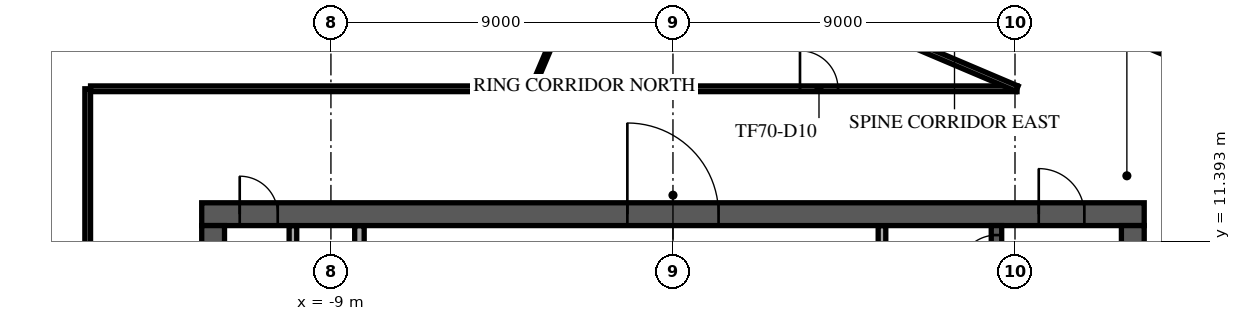
"""IFC4 building model, lengths in metres.
Left out: names, types, materials, properties, quantities, classifications, styles, units other than length and angle.
Written with IfcOpenShell. Run it as: python <this file> out.ifc"""

import sys

from ifc_helpers import new_model, si_unit, direction, frame, frame_2d, origin, place, context, subcontext, project, spatial, rectangle, extrude, element, fill, save


model = new_model("IFC4")
c1 = context("Model", 3, precision=1e-05, world=origin(), true_north=direction((0.0, 1.0)))
c2 = subcontext(c1, "Body", "Model", "MODEL_VIEW")
j1 = project(units=[si_unit("LENGTHUNIT", "METRE"), si_unit("PLANEANGLEUNIT", "RADIAN")], contexts=[c1])
p1 = place(None, origin())
s1 = spatial("IfcSite", under=j1, at=p1, CompositionType="ELEMENT")
p2 = place(p1, origin())
s2 = spatial("IfcBuilding", under=s1, at=p2, CompositionType="ELEMENT")
p3 = place(p2, frame((0.0, 0.0, 300.5)))
s3 = spatial("IfcBuildingStorey", under=s2, at=p3, CompositionType="ELEMENT", Elevation=300.5)
p4 = place(p3, frame((-12.4, 12.1, 0.0), z_axis=(0.0, 0.0, 1.0), x_axis=(1.0, 0.0, 0.0)))
e1 = element("IfcWall", 1, at=p4, inside=s3, PredefinedType="SHEAR", context=c2, shape_type="SweptSolid", body=[
    extrude(rectangle(XDim=24.8, YDim=0.6, at=frame_2d((12.4, 0.0))), origin(), (0.0, 0.0, 1.0), 3.65),
])
p5 = place(p4, frame((11.2, 0.0, 0.0)))
e2 = element("IfcOpeningElement", 2, at=p5, cuts=e1, PredefinedType="OPENING", context=c2, shape_type="SweptSolid", body=[
    extrude(rectangle(XDim=2.4, YDim=2.4, at=frame_2d((1.2, 1.2))), frame((0.0, 0.31, 0.0), z_axis=(0.0, -1.0, 0.0), x_axis=(1.0, 0.0, 0.0)), (0.0, 0.0, 1.0), 0.62),
])
p6 = place(p4, frame((22.025, 0.0, 0.0)))
e3 = element("IfcOpeningElement", 3, at=p6, cuts=e1, PredefinedType="OPENING", context=c2, shape_type="SweptSolid", body=[
    extrude(rectangle(XDim=1.2, YDim=2.1, at=frame_2d((0.6, 1.05))), frame((0.0, 0.31, 0.0), z_axis=(0.0, -1.0, 0.0), x_axis=(1.0, 0.0, 0.0)), (0.0, 0.0, 1.0), 0.62),
])
p7 = place(p4, frame((1.0, 0.0, 0.0)))
e4 = element("IfcOpeningElement", 4, at=p7, cuts=e1, PredefinedType="OPENING", context=c2, shape_type="SweptSolid", body=[
    extrude(rectangle(XDim=1.0, YDim=2.1, at=frame_2d((0.5, 1.05))), frame((0.0, 0.31, 0.0), z_axis=(0.0, -1.0, 0.0), x_axis=(1.0, 0.0, 0.0)), (0.0, 0.0, 1.0), 0.62),
])
p8 = place(p3, frame((12.1, -11.8, 0.0), z_axis=(0.0, 0.0, 1.0), x_axis=(0.0, 1.0, 0.0)))
e5 = element("IfcWall", 5, at=p8, inside=s3, PredefinedType="SHEAR", context=c2, shape_type="SweptSolid", body=[
    extrude(rectangle(XDim=23.6, YDim=0.6, at=frame_2d((11.8, 0.0))), origin(), (0.0, 0.0, 1.0), 3.65),
])
p9 = place(p8, frame((10.6, 0.0, 0.0)))
e6 = element("IfcOpeningElement", 6, at=p9, cuts=e5, PredefinedType="OPENING", context=c2, shape_type="SweptSolid", body=[
    extrude(rectangle(XDim=2.4, YDim=2.4, at=frame_2d((1.2, 1.2))), frame((0.0, 0.31, 0.0), z_axis=(0.0, -1.0, 0.0), x_axis=(1.0, 0.0, 0.0)), (0.0, 0.0, 1.0), 0.62),
])
p10 = place(p3, frame((-12.1, -11.8, 0.0), z_axis=(0.0, 0.0, 1.0), x_axis=(0.0, 1.0, 0.0)))
e7 = element("IfcWall", 7, at=p10, inside=s3, PredefinedType="SHEAR", context=c2, shape_type="SweptSolid", body=[
    extrude(rectangle(XDim=23.6, YDim=0.6, at=frame_2d((11.8, 0.0))), origin(), (0.0, 0.0, 1.0), 3.65),
])
p11 = place(p10, frame((10.6, 0.0, 0.0)))
e8 = element("IfcOpeningElement", 8, at=p11, cuts=e7, PredefinedType="OPENING", context=c2, shape_type="SweptSolid", body=[
    extrude(rectangle(XDim=2.4, YDim=2.4, at=frame_2d((1.2, 1.2))), frame((0.0, 0.31, 0.0), z_axis=(0.0, -1.0, 0.0), x_axis=(1.0, 0.0, 0.0)), (0.0, 0.0, 1.0), 0.62),
])
p12 = place(p3, frame((8.512, 4.55, 0.0), z_axis=(0.0, 0.0, 1.0), x_axis=(0.0, 1.0, 0.0)))
e9 = element("IfcWall", 9, at=p12, inside=s3, PredefinedType="SOLIDWALL", context=c2, shape_type="SweptSolid", body=[
    extrude(rectangle(XDim=7.25, YDim=0.275, at=frame_2d((3.625, 0.0))), origin(), (0.0, 0.0, 1.0), 3.65),
])
p13 = place(p12, frame((6.0, 0.0, 0.0)))
e10 = element("IfcOpeningElement", 10, at=p13, cuts=e9, PredefinedType="OPENING", context=c2, shape_type="SweptSolid", body=[
    extrude(rectangle(XDim=1.0, YDim=2.1, at=frame_2d((0.5, 1.05))), frame((0.0, 0.147, 0.0), z_axis=(0.0, -1.0, 0.0), x_axis=(1.0, 0.0, 0.0)), (0.0, 0.0, 1.0), 0.295),
])
p14 = place(p3, frame((-10.0, 4.78, 0.0), z_axis=(0.0, 0.0, 1.0), x_axis=(0.0, 1.0, 0.0)))
e11 = element("IfcWall", 11, at=p14, inside=s3, PredefinedType="PARTITIONING", context=c2, shape_type="SweptSolid", body=[
    extrude(rectangle(XDim=7.015, YDim=0.2, at=frame_2d((3.507, 0.0))), origin(), (0.0, 0.0, 1.0), 3.65),
])
p15 = place(p14, frame((2.92, 0.0, 0.0)))
e12 = element("IfcOpeningElement", 12, at=p15, cuts=e11, PredefinedType="OPENING", context=c2, shape_type="SweptSolid", body=[
    extrude(rectangle(XDim=1.0, YDim=2.1, at=frame_2d((0.5, 1.05))), frame((0.0, 0.11, 0.0), z_axis=(0.0, -1.0, 0.0), x_axis=(1.0, 0.0, 0.0)), (0.0, 0.0, 1.0), 0.22),
])
p16 = place(p3, frame((-8.25, 8.805, 0.0), z_axis=(0.0, 0.0, 1.0), x_axis=(0.0, 1.0, 0.0)))
e13 = element("IfcWall", 13, at=p16, inside=s3, PredefinedType="PARTITIONING", context=c2, shape_type="SweptSolid", body=[
    extrude(rectangle(XDim=2.99, YDim=0.25, at=frame_2d((1.495, 0.0))), origin(), (0.0, 0.0, 1.0), 3.65),
])
p17 = place(p16, frame((0.895, 0.0, 0.0)))
e14 = element("IfcOpeningElement", 14, at=p17, cuts=e13, PredefinedType="OPENING", context=c2, shape_type="SweptSolid", body=[
    extrude(rectangle(XDim=1.0, YDim=2.1, at=frame_2d((0.5, 1.05))), frame((0.0, 0.135, 0.0), z_axis=(0.0, -1.0, 0.0), x_axis=(1.0, 0.0, 0.0)), (0.0, 0.0, 1.0), 0.27),
])
p18 = place(p3, frame((5.5, 8.805, 0.0), z_axis=(0.0, 0.0, 1.0), x_axis=(0.0, 1.0, 0.0)))
e15 = element("IfcWall", 15, at=p18, inside=s3, PredefinedType="PARTITIONING", context=c2, shape_type="SweptSolid", body=[
    extrude(rectangle(XDim=2.99, YDim=0.2, at=frame_2d((1.495, 0.0))), origin(), (0.0, 0.0, 1.0), 3.65),
])
p19 = place(p18, frame((0.532, 0.0, 0.0)))
e16 = element("IfcOpeningElement", 16, at=p19, cuts=e15, PredefinedType="OPENING", context=c2, shape_type="SweptSolid", body=[
    extrude(rectangle(XDim=1.8, YDim=2.1, at=frame_2d((0.9, 1.05))), frame((0.0, 0.11, 0.0), z_axis=(0.0, -1.0, 0.0), x_axis=(1.0, 0.0, 0.0)), (0.0, 0.0, 1.0), 0.22),
])
p20 = place(p3, frame((-15.005, 32.985, 0.0), z_axis=(0.0, 0.0, 1.0), x_axis=(-0.39073034436, -0.920505186295, 0.0)))
e17 = element("IfcWall", 17, at=p20, inside=s3, PredefinedType="STANDARD", context=c2, shape_type="SweptSolid", body=[
    extrude(rectangle(XDim=48.49, YDim=0.6, at=frame_2d((24.245, 0.0))), origin(), (0.0, 0.0, 1.0), 3.65),
])
p21 = place(p20, frame((1.204, 0.0, 0.9)))
e18 = element("IfcOpeningElement", 18, at=p21, cuts=e17, PredefinedType="OPENING", context=c2, shape_type="SweptSolid", body=[
    extrude(rectangle(XDim=2.0, YDim=2.1, at=frame_2d((1.0, 1.05))), frame((0.0, 0.31, 0.0), z_axis=(0.0, -1.0, 0.0), x_axis=(1.0, 0.0, 0.0)), (0.0, 0.0, 1.0), 0.62),
])
p22 = place(p20, frame((5.612, 0.0, 0.9)))
e19 = element("IfcOpeningElement", 19, at=p22, cuts=e17, PredefinedType="OPENING", context=c2, shape_type="SweptSolid", body=[
    extrude(rectangle(XDim=2.0, YDim=2.1, at=frame_2d((1.0, 1.05))), frame((0.0, 0.31, 0.0), z_axis=(0.0, -1.0, 0.0), x_axis=(1.0, 0.0, 0.0)), (0.0, 0.0, 1.0), 0.62),
])
p23 = place(p20, frame((10.021, 0.0, 0.9)))
e20 = element("IfcOpeningElement", 20, at=p23, cuts=e17, PredefinedType="OPENING", context=c2, shape_type="SweptSolid", body=[
    extrude(rectangle(XDim=2.0, YDim=2.1, at=frame_2d((1.0, 1.05))), frame((0.0, 0.31, 0.0), z_axis=(0.0, -1.0, 0.0), x_axis=(1.0, 0.0, 0.0)), (0.0, 0.0, 1.0), 0.62),
])
p24 = place(p20, frame((14.428, 0.0, 0.9)))
e21 = element("IfcOpeningElement", 21, at=p24, cuts=e17, PredefinedType="OPENING", context=c2, shape_type="SweptSolid", body=[
    extrude(rectangle(XDim=2.0, YDim=2.1, at=frame_2d((1.0, 1.05))), frame((0.0, 0.31, 0.0), z_axis=(0.0, -1.0, 0.0), x_axis=(1.0, 0.0, 0.0)), (0.0, 0.0, 1.0), 0.62),
])
p25 = place(p20, frame((18.837, 0.0, 0.9)))
e22 = element("IfcOpeningElement", 22, at=p25, cuts=e17, PredefinedType="OPENING", context=c2, shape_type="SweptSolid", body=[
    extrude(rectangle(XDim=2.0, YDim=2.1, at=frame_2d((1.0, 1.05))), frame((0.0, 0.31, 0.0), z_axis=(0.0, -1.0, 0.0), x_axis=(1.0, 0.0, 0.0)), (0.0, 0.0, 1.0), 0.62),
])
p26 = place(p20, frame((23.245, 0.0, 0.9)))
e23 = element("IfcOpeningElement", 23, at=p26, cuts=e17, PredefinedType="OPENING", context=c2, shape_type="SweptSolid", body=[
    extrude(rectangle(XDim=2.0, YDim=2.1, at=frame_2d((1.0, 1.05))), frame((0.0, 0.31, 0.0), z_axis=(0.0, -1.0, 0.0), x_axis=(1.0, 0.0, 0.0)), (0.0, 0.0, 1.0), 0.62),
])
p27 = place(p20, frame((27.653, 0.0, 0.9)))
e24 = element("IfcOpeningElement", 24, at=p27, cuts=e17, PredefinedType="OPENING", context=c2, shape_type="SweptSolid", body=[
    extrude(rectangle(XDim=2.0, YDim=2.1, at=frame_2d((1.0, 1.05))), frame((0.0, 0.31, 0.0), z_axis=(0.0, -1.0, 0.0), x_axis=(1.0, 0.0, 0.0)), (0.0, 0.0, 1.0), 0.62),
])
p28 = place(p20, frame((32.061, 0.0, 0.9)))
e25 = element("IfcOpeningElement", 25, at=p28, cuts=e17, PredefinedType="OPENING", context=c2, shape_type="SweptSolid", body=[
    extrude(rectangle(XDim=2.0, YDim=2.1, at=frame_2d((1.0, 1.05))), frame((0.0, 0.31, 0.0), z_axis=(0.0, -1.0, 0.0), x_axis=(1.0, 0.0, 0.0)), (0.0, 0.0, 1.0), 0.62),
])
p29 = place(p20, frame((36.469, 0.0, 0.9)))
e26 = element("IfcOpeningElement", 26, at=p29, cuts=e17, PredefinedType="OPENING", context=c2, shape_type="SweptSolid", body=[
    extrude(rectangle(XDim=2.0, YDim=2.1, at=frame_2d((1.0, 1.05))), frame((0.0, 0.31, 0.0), z_axis=(0.0, -1.0, 0.0), x_axis=(1.0, 0.0, 0.0)), (0.0, 0.0, 1.0), 0.62),
])
p30 = place(p20, frame((40.877, 0.0, 0.9)))
e27 = element("IfcOpeningElement", 27, at=p30, cuts=e17, PredefinedType="OPENING", context=c2, shape_type="SweptSolid", body=[
    extrude(rectangle(XDim=2.0, YDim=2.1, at=frame_2d((1.0, 1.05))), frame((0.0, 0.31, 0.0), z_axis=(0.0, -1.0, 0.0), x_axis=(1.0, 0.0, 0.0)), (0.0, 0.0, 1.0), 0.62),
])
p31 = place(p20, frame((45.285, 0.0, 0.9)))
e28 = element("IfcOpeningElement", 28, at=p31, cuts=e17, PredefinedType="OPENING", context=c2, shape_type="SweptSolid", body=[
    extrude(rectangle(XDim=2.0, YDim=2.1, at=frame_2d((1.0, 1.05))), frame((0.0, 0.31, 0.0), z_axis=(0.0, -1.0, 0.0), x_axis=(1.0, 0.0, 0.0)), (0.0, 0.0, 1.0), 0.62),
])
p32 = place(p3, frame((-15.4, -12.4, 0.0), z_axis=(0.0, 0.0, 1.0), x_axis=(0.0, 1.0, 0.0)))
e29 = element("IfcWall", 29, at=p32, inside=s3, PredefinedType="PARTITIONING", context=c2, shape_type="SweptSolid", body=[
    extrude(rectangle(XDim=27.8, YDim=0.15, at=frame_2d((13.9, 0.0))), origin(), (0.0, 0.0, 1.0), 3.25),
])
p33 = place(p32, frame((7.608, 0.0, 0.0)))
e30 = element("IfcOpeningElement", 30, at=p33, cuts=e29, PredefinedType="OPENING", context=c2, shape_type="SweptSolid", body=[
    extrude(rectangle(XDim=1.0, YDim=2.1, at=frame_2d((0.5, 1.05))), frame((0.0, 0.085, 0.0), z_axis=(0.0, -1.0, 0.0), x_axis=(1.0, 0.0, 0.0)), (0.0, 0.0, 1.0), 0.17),
])
p34 = place(p32, frame((16.435, 0.0, 0.0)))
e31 = element("IfcOpeningElement", 31, at=p34, cuts=e29, PredefinedType="OPENING", context=c2, shape_type="SweptSolid", body=[
    extrude(rectangle(XDim=1.0, YDim=2.1, at=frame_2d((0.5, 1.05))), frame((0.0, 0.085, 0.0), z_axis=(0.0, -1.0, 0.0), x_axis=(1.0, 0.0, 0.0)), (0.0, 0.0, 1.0), 0.17),
])
p35 = place(p3, frame((-15.325, 15.4, 0.0), z_axis=(0.0, 0.0, 1.0), x_axis=(1.0, 0.0, 0.0)))
e32 = element("IfcWall", 32, at=p35, inside=s3, PredefinedType="PARTITIONING", context=c2, shape_type="SweptSolid", body=[
    extrude(rectangle(XDim=24.378, YDim=0.15, at=frame_2d((12.189, 0.0))), origin(), (0.0, 0.0, 1.0), 3.25),
])
p36 = place(p35, frame((18.667, 0.0, 0.0)))
e33 = element("IfcOpeningElement", 33, at=p36, cuts=e32, PredefinedType="OPENING", context=c2, shape_type="SweptSolid", body=[
    extrude(rectangle(XDim=1.0, YDim=2.1, at=frame_2d((0.5, 1.05))), frame((0.0, 0.085, 0.0), z_axis=(0.0, -1.0, 0.0), x_axis=(1.0, 0.0, 0.0)), (0.0, 0.0, 1.0), 0.17),
])
p37 = place(p3, frame((-9.114, 23.116, 0.0), z_axis=(0.0, 0.0, 1.0), x_axis=(0.920508047483, -0.390723603739, 0.0)))
e34 = element("IfcWall", 34, at=p37, inside=s3, PredefinedType="PARTITIONING", context=c2, shape_type="SweptSolid", body=[
    extrude(rectangle(XDim=19.737, YDim=0.15, at=frame_2d((9.868, 0.0))), origin(), (0.0, 0.0, 1.0), 3.25),
])
p38 = place(p3, frame((-8.176, 25.325, 0.0), z_axis=(0.0, 0.0, 1.0), x_axis=(0.920507643781, -0.390724554821, 0.0)))
e35 = element("IfcWall", 35, at=p38, inside=s3, PredefinedType="PARTITIONING", context=c2, shape_type="SweptSolid", body=[
    extrude(rectangle(XDim=34.917, YDim=0.15, at=frame_2d((17.458, 0.0))), origin(), (0.0, 0.0, 1.0), 3.25),
])
p39 = place(p38, frame((5.55, 0.0, 0.0)))
e36 = element("IfcOpeningElement", 36, at=p39, cuts=e35, PredefinedType="OPENING", context=c2, shape_type="SweptSolid", body=[
    extrude(rectangle(XDim=1.8, YDim=2.1, at=frame_2d((0.9, 1.05))), frame((0.0, 0.085, 0.0), z_axis=(0.0, -1.0, 0.0), x_axis=(1.0, 0.0, 0.0)), (0.0, 0.0, 1.0), 0.17),
])
p40 = place(p38, frame((1.05, 0.0, 0.0)))
e37 = element("IfcOpeningElement", 37, at=p40, cuts=e35, PredefinedType="OPENING", context=c2, shape_type="SweptSolid", body=[
    extrude(rectangle(XDim=1.0, YDim=2.1, at=frame_2d((0.5, 1.05))), frame((0.0, 0.085, 0.0), z_axis=(0.0, -1.0, 0.0), x_axis=(1.0, 0.0, 0.0)), (0.0, 0.0, 1.0), 0.17),
])
p41 = place(p38, frame((16.098, 0.0, 0.0)))
e38 = element("IfcOpeningElement", 38, at=p41, cuts=e35, PredefinedType="OPENING", context=c2, shape_type="SweptSolid", body=[
    extrude(rectangle(XDim=1.0, YDim=2.1, at=frame_2d((0.5, 1.05))), frame((0.0, 0.085, 0.0), z_axis=(0.0, -1.0, 0.0), x_axis=(1.0, 0.0, 0.0)), (0.0, 0.0, 1.0), 0.17),
])
p42 = place(p38, frame((23.547, 0.0, 0.0)))
e39 = element("IfcOpeningElement", 39, at=p42, cuts=e35, PredefinedType="OPENING", context=c2, shape_type="SweptSolid", body=[
    extrude(rectangle(XDim=1.0, YDim=2.1, at=frame_2d((0.5, 1.05))), frame((0.0, 0.085, 0.0), z_axis=(0.0, -1.0, 0.0), x_axis=(1.0, 0.0, 0.0)), (0.0, 0.0, 1.0), 0.17),
])
p43 = place(p3, frame((-3.667, 15.494, 0.0), z_axis=(0.0, 0.0, 1.0), x_axis=(0.390616296151, 0.920553588435, 0.0)))
e40 = element("IfcWall", 40, at=p43, inside=s3, PredefinedType="PARTITIONING", context=c2, shape_type="SweptSolid", body=[
    extrude(rectangle(XDim=4.812, YDim=0.1, at=frame_2d((2.406, 0.0))), origin(), (0.0, 0.0, 1.0), 3.25),
])
p44 = place(p5, origin())
e41 = element("IfcDoor", 41, at=p44, inside=s3, OperationType="SINGLE_SWING_LEFT", PredefinedType="DOOR", context=c2, shape_type="SweptSolid", body=[
    extrude(rectangle(XDim=2.4, YDim=2.4, at=frame_2d((1.2, 1.2))), frame((0.0, 0.025, 0.0), z_axis=(0.0, -1.0, 0.0), x_axis=(1.0, 0.0, 0.0)), (0.0, 0.0, 1.0), 0.05),
])
fill(e2, e41)
p45 = place(p6, origin())
e42 = element("IfcDoor", 42, at=p45, inside=s3, OperationType="SINGLE_SWING_LEFT", PredefinedType="DOOR", context=c2, shape_type="SweptSolid", body=[
    extrude(rectangle(XDim=1.2, YDim=2.1, at=frame_2d((0.6, 1.05))), frame((0.0, 0.025, 0.0), z_axis=(0.0, -1.0, 0.0), x_axis=(1.0, 0.0, 0.0)), (0.0, 0.0, 1.0), 0.05),
])
fill(e3, e42)
p46 = place(p7, origin())
e43 = element("IfcDoor", 43, at=p46, inside=s3, OperationType="SINGLE_SWING_LEFT", PredefinedType="DOOR", context=c2, shape_type="SweptSolid", body=[
    extrude(rectangle(XDim=1.0, YDim=2.1, at=frame_2d((0.5, 1.05))), frame((0.0, 0.025, 0.0), z_axis=(0.0, -1.0, 0.0), x_axis=(1.0, 0.0, 0.0)), (0.0, 0.0, 1.0), 0.05),
])
fill(e4, e43)
p47 = place(p13, origin())
e44 = element("IfcDoor", 44, at=p47, inside=s3, OperationType="SINGLE_SWING_LEFT", PredefinedType="DOOR", context=c2, shape_type="SweptSolid", body=[
    extrude(rectangle(XDim=1.0, YDim=2.1, at=frame_2d((0.5, 1.05))), frame((0.0, 0.025, 0.0), z_axis=(0.0, -1.0, 0.0), x_axis=(1.0, 0.0, 0.0)), (0.0, 0.0, 1.0), 0.05),
])
fill(e10, e44)
p48 = place(p36, origin())
e45 = element("IfcDoor", 45, at=p48, inside=s3, OperationType="SINGLE_SWING_RIGHT", PredefinedType="DOOR", context=c2, shape_type="SweptSolid", body=[
    extrude(rectangle(XDim=1.0, YDim=2.1, at=frame_2d((0.5, 1.05))), frame((0.0, 0.025, 0.0), z_axis=(0.0, -1.0, 0.0), x_axis=(1.0, 0.0, 0.0)), (0.0, 0.0, 1.0), 0.05),
])
fill(e33, e45)
save(model, sys.argv[1])
